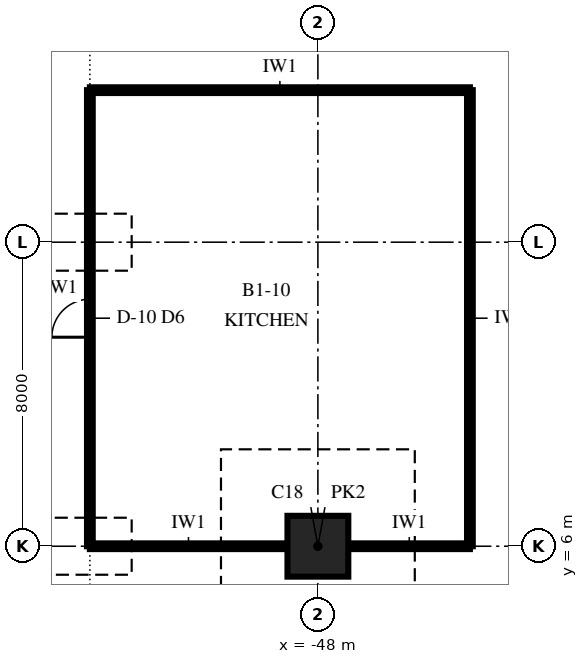
"""IFC4 building model, lengths in metres.
Left out: names, types, materials, properties, quantities, classifications, styles, units other than length and angle.
Written with IfcOpenShell. Run it as: python <this file> out.ifc"""

import sys

from ifc_helpers import new_model, si_unit, direction, frame, frame_2d, origin, origin_2d, place, context, subcontext, project, spatial, rectangle, extrude, element, fill, save


model = new_model("IFC4")
c1 = context("Model", 3, precision=1e-05, world=origin(), true_north=direction((0.0, 1.0)))
c2 = subcontext(c1, "Body", "Model", "MODEL_VIEW")
j1 = project(units=[si_unit("LENGTHUNIT", "METRE"), si_unit("PLANEANGLEUNIT", "RADIAN")], contexts=[c1])
p1 = place(None, origin())
s1 = spatial("IfcSite", under=j1, at=p1, CompositionType="ELEMENT")
p2 = place(p1, origin())
s2 = spatial("IfcBuilding", under=s1, at=p2, CompositionType="ELEMENT")
p3 = place(p2, frame((0.0, 0.0, -7.0)))
s3 = spatial("IfcBuildingStorey", under=s2, at=p3, CompositionType="ELEMENT", Elevation=-7.0)
p4 = place(p3, frame((-48.0, 6.0, -0.6), z_axis=(0.0, 0.0, 1.0), x_axis=(1.0, 0.0, 0.0)))
e1 = element("IfcColumn", 1, at=p4, inside=s3, PredefinedType="COLUMN", context=c2, shape_type="SweptSolid", body=[
    extrude(rectangle(XDim=1.6, YDim=1.6, at=origin_2d()), origin(), (0.0, 0.0, 1.0), 7.6),
])
p5 = place(p3, frame((-54.0, 6.0, 0.0), z_axis=(0.0, 0.0, 1.0), x_axis=(0.0, 1.0, 0.0)))
e2 = element("IfcWall", 2, at=p5, inside=s3, PredefinedType="PARTITIONING", context=c2, shape_type="SweptSolid", body=[
    extrude(rectangle(XDim=12.0, YDim=0.15, at=frame_2d((6.0, 0.0))), origin(), (0.0, 0.0, 1.0), 6.7),
])
p6 = place(p5, frame((5.5, 0.0, 0.0)))
e3 = element("IfcOpeningElement", 3, at=p6, cuts=e2, PredefinedType="OPENING", context=c2, shape_type="SweptSolid", body=[
    extrude(rectangle(XDim=1.0, YDim=2.1, at=frame_2d((0.5, 1.05))), frame((0.0, 0.09, 0.0), z_axis=(0.0, -1.0, 0.0), x_axis=(1.0, 0.0, 0.0)), (0.0, 0.0, 1.0), 0.18),
])
p7 = place(p3, frame((-44.0, 6.0, 0.0), z_axis=(0.0, 0.0, 1.0), x_axis=(0.0, 1.0, 0.0)))
e4 = element("IfcWall", 4, at=p7, inside=s3, PredefinedType="PARTITIONING", context=c2, shape_type="SweptSolid", body=[
    extrude(rectangle(XDim=12.0, YDim=0.15, at=frame_2d((6.0, 0.0))), origin(), (0.0, 0.0, 1.0), 6.7),
])
p8 = place(p3, frame((-54.0, 6.0, 0.0), z_axis=(0.0, 0.0, 1.0), x_axis=(1.0, 0.0, 0.0)))
e5 = element("IfcWall", 5, at=p8, inside=s3, PredefinedType="PARTITIONING", context=c2, shape_type="SweptSolid", body=[
    extrude(rectangle(XDim=5.19, YDim=0.15, at=frame_2d((2.595, 0.0))), origin(), (0.0, 0.0, 1.0), 6.05),
])
p9 = place(p3, frame((-47.19, 6.0, 0.0), z_axis=(0.0, 0.0, 1.0), x_axis=(1.0, 0.0, 0.0)))
e6 = element("IfcWall", 6, at=p9, inside=s3, PredefinedType="PARTITIONING", context=c2, shape_type="SweptSolid", body=[
    extrude(rectangle(XDim=3.19, YDim=0.15, at=frame_2d((1.595, 0.0))), origin(), (0.0, 0.0, 1.0), 6.05),
])
p10 = place(p3, frame((-54.0, 18.0, 0.0), z_axis=(0.0, 0.0, 1.0), x_axis=(1.0, 0.0, 0.0)))
e7 = element("IfcWall", 7, at=p10, inside=s3, PredefinedType="PARTITIONING", context=c2, shape_type="SweptSolid", body=[
    extrude(rectangle(XDim=10.0, YDim=0.15, at=frame_2d((5.0, 0.0))), origin(), (0.0, 0.0, 1.0), 6.7),
])
p11 = place(p6, origin())
e8 = element("IfcDoor", 8, at=p11, inside=s3, OperationType="SINGLE_SWING_LEFT", PredefinedType="DOOR", context=c2, shape_type="SweptSolid", body=[
    extrude(rectangle(XDim=1.0, YDim=2.1, at=frame_2d((0.5, 1.05))), frame((0.0, 0.075, 0.0), z_axis=(0.0, -1.0, 0.0), x_axis=(1.0, 0.0, 0.0)), (0.0, 0.0, 1.0), 0.149),
])
fill(e3, e8)
save(model, sys.argv[1])
